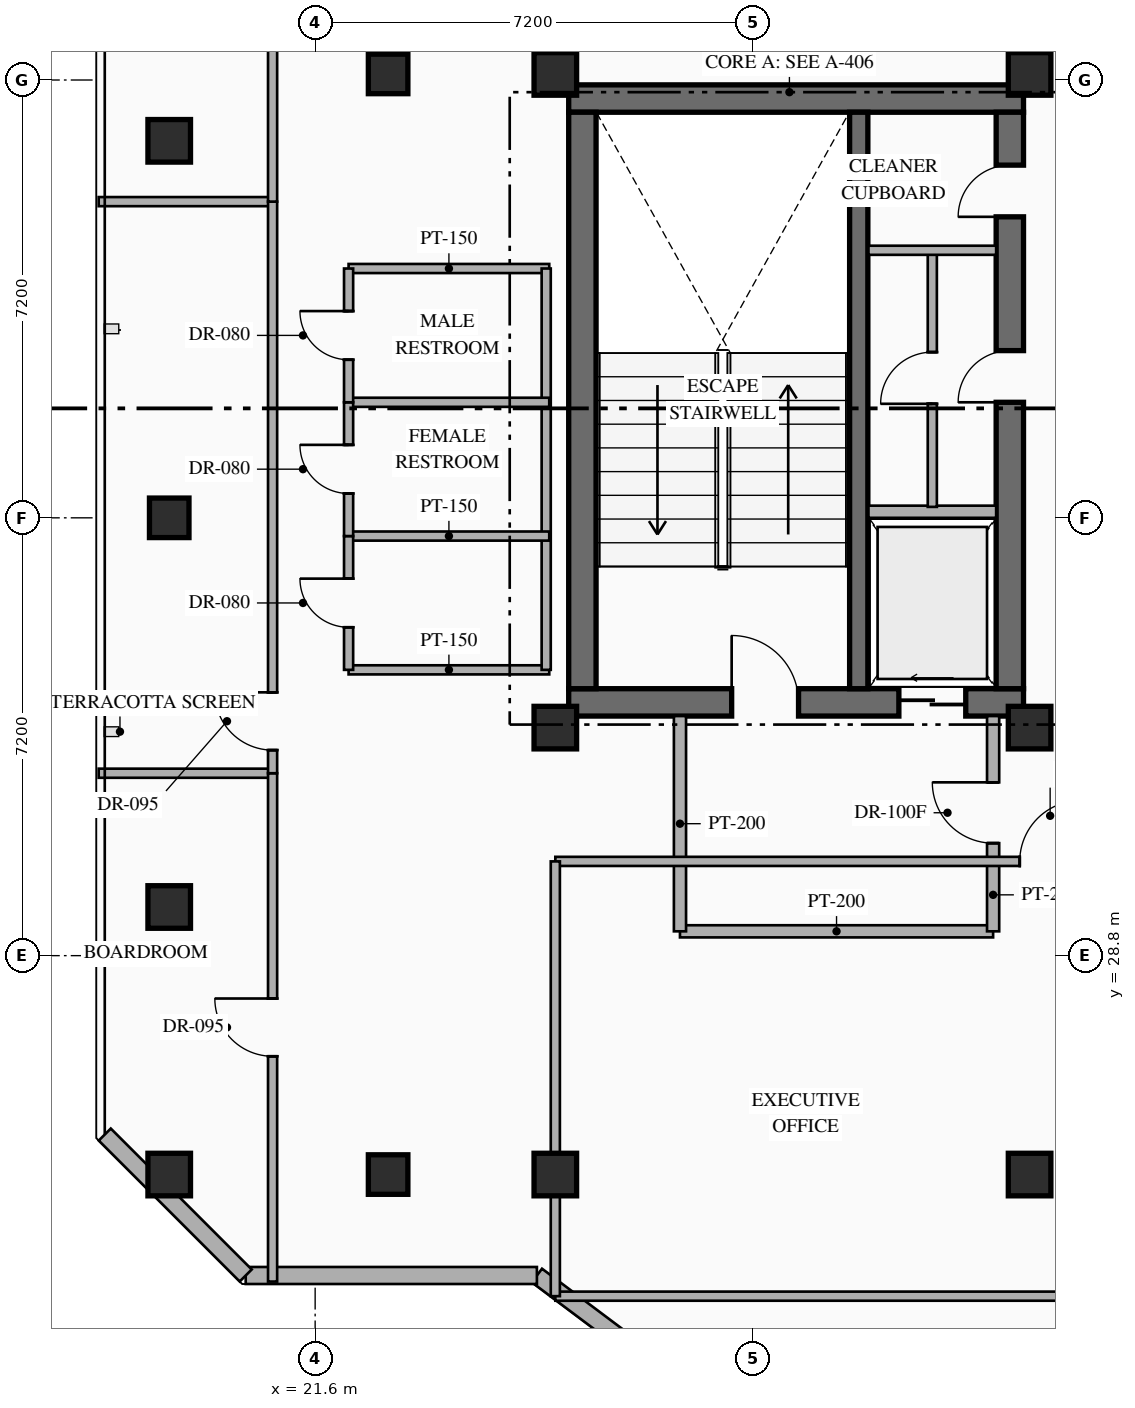
"""IFC4 building model, lengths in metres.
Left out: names, types, materials, properties, quantities, classifications, styles, units other than length and angle.
Written with IfcOpenShell. Run it as: python <this file> out.ifc"""

import sys

from ifc_helpers import new_model, si_unit, direction, frame, frame_2d, origin, origin_2d, place, context, subcontext, project, spatial, rectangle, hollow_rectangle, extrude, element, fill, save


model = new_model("IFC4")
c1 = context("Model", 3, precision=1e-05, world=origin(), true_north=direction((0.0, 1.0)))
c2 = subcontext(c1, "Body", "Model", "MODEL_VIEW")
j1 = project(units=[si_unit("LENGTHUNIT", "METRE"), si_unit("PLANEANGLEUNIT", "RADIAN")], contexts=[c1])
p1 = place(None, origin())
s1 = spatial("IfcSite", under=j1, at=p1, CompositionType="ELEMENT")
p2 = place(p1, origin())
s2 = spatial("IfcBuilding", under=s1, at=p2, CompositionType="ELEMENT")
p3 = place(p2, frame((0.0, 0.0, 231.15)))
s3 = spatial("IfcBuildingStorey", under=s2, at=p3, CompositionType="ELEMENT", Elevation=231.15)
p4 = place(p3, frame((25.77, 32.965, 0.0), z_axis=(0.0, 0.0, 1.0), x_axis=(1.0, 0.0, 0.0)))
e1 = element("IfcWall", 1, at=p4, inside=s3, PredefinedType="SHEAR", context=c2, shape_type="SweptSolid", body=[
    extrude(rectangle(XDim=7.48, YDim=0.45, at=frame_2d((3.74, 0.0))), origin(), (0.0, 0.0, 1.0), 3.6),
])
p5 = place(p4, frame((2.68, 0.0, 0.0)))
e2 = element("IfcOpeningElement", 2, at=p5, cuts=e1, PredefinedType="OPENING", context=c2, shape_type="SweptSolid", body=[
    extrude(rectangle(XDim=1.1, YDim=2.2, at=frame_2d((0.55, 1.1))), frame((0.0, 0.235, 0.0), z_axis=(0.0, -1.0, 0.0), x_axis=(1.0, 0.0, 0.0)), (0.0, 0.0, 1.0), 0.47),
])
p6 = place(p4, frame((5.43, 0.0, 0.0)))
e3 = element("IfcOpeningElement", 3, at=p6, cuts=e1, PredefinedType="OPENING", context=c2, shape_type="SweptSolid", body=[
    extrude(rectangle(XDim=1.1, YDim=2.15, at=frame_2d((0.55, 1.075))), frame((0.0, 0.235, 0.0), z_axis=(0.0, -1.0, 0.0), x_axis=(1.0, 0.0, 0.0)), (0.0, 0.0, 1.0), 0.47),
])
p7 = place(p3, frame((25.77, 42.895, 0.0), z_axis=(0.0, 0.0, 1.0), x_axis=(1.0, 0.0, 0.0)))
e4 = element("IfcWall", 4, at=p7, inside=s3, PredefinedType="SHEAR", context=c2, shape_type="SweptSolid", body=[
    extrude(rectangle(XDim=7.48, YDim=0.45, at=frame_2d((3.74, 0.0))), origin(), (0.0, 0.0, 1.0), 3.6),
])
p8 = place(p3, frame((25.995, 33.19, 0.0), z_axis=(0.0, 0.0, 1.0), x_axis=(0.0, 1.0, 0.0)))
e5 = element("IfcWall", 5, at=p8, inside=s3, PredefinedType="SHEAR", context=c2, shape_type="SweptSolid", body=[
    extrude(rectangle(XDim=9.48, YDim=0.45, at=frame_2d((4.74, 0.0))), origin(), (0.0, 0.0, 1.0), 3.6),
])
p9 = place(p3, frame((33.025, 33.19, 0.0), z_axis=(0.0, 0.0, 1.0), x_axis=(0.0, 1.0, 0.0)))
e6 = element("IfcWall", 6, at=p9, inside=s3, PredefinedType="SHEAR", context=c2, shape_type="SweptSolid", body=[
    extrude(rectangle(XDim=9.48, YDim=0.45, at=frame_2d((4.74, 0.0))), origin(), (0.0, 0.0, 1.0), 3.6),
])
p10 = place(p9, frame((4.71, 0.0, 0.0)))
e7 = element("IfcOpeningElement", 7, at=p10, cuts=e6, PredefinedType="OPENING", context=c2, shape_type="SweptSolid", body=[
    extrude(rectangle(XDim=0.85, YDim=2.08, at=frame_2d((0.425, 1.04))), frame((0.0, 0.235, 0.0), z_axis=(0.0, -1.0, 0.0), x_axis=(1.0, 0.0, 0.0)), (0.0, 0.0, 1.0), 0.47),
])
p11 = place(p9, frame((7.76, 0.0, 0.0)))
e8 = element("IfcOpeningElement", 8, at=p11, cuts=e6, PredefinedType="OPENING", context=c2, shape_type="SweptSolid", body=[
    extrude(rectangle(XDim=0.85, YDim=2.08, at=frame_2d((0.425, 1.04))), frame((0.0, 0.235, 0.0), z_axis=(0.0, -1.0, 0.0), x_axis=(1.0, 0.0, 0.0)), (0.0, 0.0, 1.0), 0.47),
])
p12 = place(p3, frame((30.54, 33.19, 0.0), z_axis=(0.0, 0.0, 1.0), x_axis=(0.0, 1.0, 0.0)))
e9 = element("IfcWall", 9, at=p12, inside=s3, PredefinedType="SHEAR", context=c2, shape_type="SweptSolid", body=[
    extrude(rectangle(XDim=9.48, YDim=0.3, at=frame_2d((4.74, 0.0))), origin(), (0.0, 0.0, 1.0), 3.6),
])
for number, where, z_axis, x_axis in (
    (10, (25.55, 32.55, 0.0), (0.0, 0.0, 1.0), (1.0, 0.0, 0.0)),
    (11, (33.35, 32.55, 0.0), (0.0, 0.0, 1.0), (1.0, 0.0, 0.0)),
    (12, (25.55, 43.3, 0.0), (0.0, 0.0, 1.0), (1.0, 0.0, 0.0)),
    (13, (33.35, 43.3, 0.0), (0.0, 0.0, 1.0), (1.0, 0.0, 0.0)),
    (14, (25.55, 25.2, 0.0), (0.0, 0.0, 1.0), (1.0, 0.0, 0.0)),
    (15, (33.35, 25.2, 0.0), (0.0, 0.0, 1.0), (1.0, 0.0, 0.0)),
    (16, (19.2, 25.2, 0.0), (0.0, 0.0, 1.0), (1.0, 0.0, 0.0)),
    (17, (19.2, 29.6, 0.0), (0.0, 0.0, 1.0), (1.0, 0.0, 0.0)),
    (18, (19.2, 42.2, 0.0), (0.0, 0.0, 1.0), (1.0, 0.0, 0.0)),
):
    element("IfcColumn", number, at=place(p3, frame(where, z_axis=z_axis, x_axis=x_axis)), inside=s3, PredefinedType="COLUMN", context=c2, shape_type="SweptSolid", body=[
        extrude(hollow_rectangle(XDim=0.7, YDim=0.7, WallThickness=0.028, at=origin_2d()), origin(), (0.0, 0.0, 1.0), 3.6),
    ])
for number, where, z_axis, x_axis in (
    (19, (22.8, 25.2, 0.0), (0.0, 0.0, 1.0), (1.0, 0.0, 0.0)),
    (20, (22.8, 43.3, 0.0), (0.0, 0.0, 1.0), (1.0, 0.0, 0.0)),
    (21, (19.2, 36.0, 0.0), (0.0, 0.0, 1.0), (1.0, 0.0, 0.0)),
):
    element("IfcColumn", number, at=place(p3, frame(where, z_axis=z_axis, x_axis=x_axis)), inside=s3, PredefinedType="COLUMN", context=c2, shape_type="SweptSolid", body=[
        extrude(hollow_rectangle(XDim=0.65, YDim=0.65, WallThickness=0.025, at=origin_2d()), origin(), (0.0, 0.0, 1.0), 3.6),
    ])
p13 = place(p3, frame((44.918, 8.787, 0.0), z_axis=(0.0, 0.0, 1.0), x_axis=(-0.800004765927, 0.599993645378, 0.0)))
e22 = element("IfcWall", 22, at=p13, inside=s3, PredefinedType="STANDARD", context=c2, shape_type="SweptSolid", body=[
    extrude(rectangle(XDim=24.588, YDim=0.28, at=frame_2d((12.294, 0.0))), origin(), (0.0, 0.0, 1.0), 3.3),
])
p14 = place(p3, frame((25.247, 23.54, 0.0), z_axis=(0.0, 0.0, 1.0), x_axis=(-1.0, 0.0, 0.0)))
e23 = element("IfcWall", 23, at=p14, inside=s3, PredefinedType="STANDARD", context=c2, shape_type="SweptSolid", body=[
    extrude(rectangle(XDim=4.789, YDim=0.28, at=frame_2d((2.395, 0.0))), origin(), (0.0, 0.0, 1.0), 3.3),
])
p15 = place(p3, frame((20.458, 23.54, 0.0), z_axis=(0.0, 0.0, 1.0), x_axis=(-0.707144017911, 0.707069542501, 0.0)))
e24 = element("IfcWall", 24, at=p15, inside=s3, PredefinedType="STANDARD", context=c2, shape_type="SweptSolid", body=[
    extrude(rectangle(XDim=3.278, YDim=0.28, at=frame_2d((1.639, 0.0))), origin(), (0.0, 0.0, 1.0), 3.3),
])
p16 = place(p3, frame((30.7, 36.1, 0.0), z_axis=(0.0, 0.0, 1.0), x_axis=(1.0, 0.0, 0.0)))
e25 = element("IfcWall", 25, at=p16, inside=s3, PredefinedType="STANDARD", context=c2, shape_type="SweptSolid", body=[
    extrude(rectangle(XDim=2.1, YDim=0.2, at=frame_2d((1.05, 0.0))), origin(), (0.0, 0.0, 1.0), 3.3),
])
p17 = place(p3, frame((31.75, 36.18, 0.0), z_axis=(0.0, 0.0, 1.0), x_axis=(0.0, 1.0, 0.0)))
e26 = element("IfcWall", 26, at=p17, inside=s3, PredefinedType="PARTITIONING", context=c2, shape_type="SweptSolid", body=[
    extrude(rectangle(XDim=4.24, YDim=0.15, at=frame_2d((2.12, 0.0))), origin(), (0.0, 0.0, 1.0), 3.3),
])
p18 = place(p17, frame((1.695, 0.0, 0.0)))
e27 = element("IfcOpeningElement", 27, at=p18, cuts=e26, PredefinedType="OPENING", context=c2, shape_type="SweptSolid", body=[
    extrude(rectangle(XDim=0.85, YDim=2.08, at=frame_2d((0.425, 1.04))), frame((0.0, 0.085, 0.0), z_axis=(0.0, -1.0, 0.0), x_axis=(1.0, 0.0, 0.0)), (0.0, 0.0, 1.0), 0.17),
])
p19 = place(p3, frame((30.7, 40.4, 0.0), z_axis=(0.0, 0.0, 1.0), x_axis=(1.0, 0.0, 0.0)))
e28 = element("IfcWall", 28, at=p19, inside=s3, PredefinedType="PARTITIONING", context=c2, shape_type="SweptSolid", body=[
    extrude(rectangle(XDim=2.1, YDim=0.15, at=frame_2d((1.05, 0.0))), origin(), (0.0, 0.0, 1.0), 3.3),
])
p20 = place(p3, frame((27.6, 29.2, 0.0), z_axis=(0.0, 0.0, 1.0), x_axis=(1.0, 0.0, 0.0)))
e29 = element("IfcWall", 29, at=p20, inside=s3, PredefinedType="STANDARD", context=c2, shape_type="SweptSolid", body=[
    extrude(rectangle(XDim=5.15, YDim=0.2, at=frame_2d((2.575, 0.0))), origin(), (0.0, 0.0, 1.0), 3.3),
])
p21 = place(p3, frame((27.6, 29.2, 0.0), z_axis=(0.0, 0.0, 1.0), x_axis=(0.0, 1.0, 0.0)))
e30 = element("IfcWall", 30, at=p21, inside=s3, PredefinedType="STANDARD", context=c2, shape_type="SweptSolid", body=[
    extrude(rectangle(XDim=3.54, YDim=0.2, at=frame_2d((1.77, 0.0))), origin(), (0.0, 0.0, 1.0), 3.3),
])
p22 = place(p3, frame((32.75, 29.2, 0.0), z_axis=(0.0, 0.0, 1.0), x_axis=(0.0, 1.0, 0.0)))
e31 = element("IfcWall", 31, at=p22, inside=s3, PredefinedType="STANDARD", context=c2, shape_type="SweptSolid", body=[
    extrude(rectangle(XDim=3.54, YDim=0.2, at=frame_2d((1.77, 0.0))), origin(), (0.0, 0.0, 1.0), 3.3),
])
p23 = place(p22, frame((1.45, 0.0, 0.0)))
e32 = element("IfcOpeningElement", 32, at=p23, cuts=e31, PredefinedType="OPENING", context=c2, shape_type="SweptSolid", body=[
    extrude(rectangle(XDim=1.0, YDim=2.2, at=frame_2d((0.5, 1.1))), frame((0.0, 0.11, 0.0), z_axis=(0.0, -1.0, 0.0), x_axis=(1.0, 0.0, 0.0)), (0.0, 0.0, 1.0), 0.22),
])
for number, where, z_axis, x_axis in (
    (33, (22.15, 33.5, 0.0), (0.0, 0.0, 1.0), (1.0, 0.0, 0.0)),
    (34, (22.15, 40.1, 0.0), (0.0, 0.0, 1.0), (1.0, 0.0, 0.0)),
):
    element("IfcWall", number, at=place(p3, frame(where, z_axis=z_axis, x_axis=x_axis)), inside=s3, PredefinedType="PARTITIONING", context=c2, shape_type="SweptSolid", body=[
        extrude(rectangle(XDim=3.3, YDim=0.15, at=frame_2d((1.65, 0.0))), origin(), (0.0, 0.0, 1.0), 3.3),
    ])
p24 = place(p3, frame((25.4, 33.5, 0.0), z_axis=(0.0, 0.0, 1.0), x_axis=(0.0, 1.0, 0.0)))
e35 = element("IfcWall", 35, at=p24, inside=s3, PredefinedType="PARTITIONING", context=c2, shape_type="SweptSolid", body=[
    extrude(rectangle(XDim=6.6, YDim=0.15, at=frame_2d((3.3, 0.0))), origin(), (0.0, 0.0, 1.0), 3.3),
])
for number, where, z_axis, x_axis in (
    (36, (22.15, 35.7, 0.0), (0.0, 0.0, 1.0), (1.0, 0.0, 0.0)),
    (37, (22.15, 37.9, 0.0), (0.0, 0.0, 1.0), (1.0, 0.0, 0.0)),
):
    element("IfcWall", number, at=place(p3, frame(where, z_axis=z_axis, x_axis=x_axis)), inside=s3, PredefinedType="PARTITIONING", context=c2, shape_type="SweptSolid", body=[
        extrude(rectangle(XDim=3.3, YDim=0.15, at=frame_2d((1.65, 0.0))), origin(), (0.0, 0.0, 1.0), 3.3),
    ])
p25 = place(p3, frame((22.15, 33.5, 0.0), z_axis=(0.0, 0.0, 1.0), x_axis=(0.0, 1.0, 0.0)))
e38 = element("IfcWall", 38, at=p25, inside=s3, PredefinedType="PARTITIONING", context=c2, shape_type="SweptSolid", body=[
    extrude(rectangle(XDim=2.2, YDim=0.15, at=frame_2d((1.1, 0.0))), origin(), (0.0, 0.0, 1.0), 3.3),
])
p26 = place(p25, frame((0.7, 0.0, 0.0)))
e39 = element("IfcOpeningElement", 39, at=p26, cuts=e38, PredefinedType="OPENING", context=c2, shape_type="SweptSolid", body=[
    extrude(rectangle(XDim=0.8, YDim=2.06, at=frame_2d((0.4, 1.03))), frame((0.0, 0.085, 0.0), z_axis=(0.0, -1.0, 0.0), x_axis=(1.0, 0.0, 0.0)), (0.0, 0.0, 1.0), 0.17),
])
p27 = place(p3, frame((22.15, 35.7, 0.0), z_axis=(0.0, 0.0, 1.0), x_axis=(0.0, 1.0, 0.0)))
e40 = element("IfcWall", 40, at=p27, inside=s3, PredefinedType="PARTITIONING", context=c2, shape_type="SweptSolid", body=[
    extrude(rectangle(XDim=2.2, YDim=0.15, at=frame_2d((1.1, 0.0))), origin(), (0.0, 0.0, 1.0), 3.3),
])
p28 = place(p27, frame((0.7, 0.0, 0.0)))
e41 = element("IfcOpeningElement", 41, at=p28, cuts=e40, PredefinedType="OPENING", context=c2, shape_type="SweptSolid", body=[
    extrude(rectangle(XDim=0.8, YDim=2.06, at=frame_2d((0.4, 1.03))), frame((0.0, 0.085, 0.0), z_axis=(0.0, -1.0, 0.0), x_axis=(1.0, 0.0, 0.0)), (0.0, 0.0, 1.0), 0.17),
])
p29 = place(p3, frame((22.15, 37.9, 0.0), z_axis=(0.0, 0.0, 1.0), x_axis=(0.0, 1.0, 0.0)))
e42 = element("IfcWall", 42, at=p29, inside=s3, PredefinedType="PARTITIONING", context=c2, shape_type="SweptSolid", body=[
    extrude(rectangle(XDim=2.2, YDim=0.15, at=frame_2d((1.1, 0.0))), origin(), (0.0, 0.0, 1.0), 3.3),
])
p30 = place(p29, frame((0.7, 0.0, 0.0)))
e43 = element("IfcOpeningElement", 43, at=p30, cuts=e42, PredefinedType="OPENING", context=c2, shape_type="SweptSolid", body=[
    extrude(rectangle(XDim=0.8, YDim=2.06, at=frame_2d((0.4, 1.03))), frame((0.0, 0.085, 0.0), z_axis=(0.0, -1.0, 0.0), x_axis=(1.0, 0.0, 0.0)), (0.0, 0.0, 1.0), 0.17),
])
p31 = place(p3, frame((25.55, 23.2, 0.0), z_axis=(0.0, 0.0, 1.0), x_axis=(1.0, 0.0, 0.0)))
e44 = element("IfcWall", 44, at=p31, inside=s3, PredefinedType="PARTITIONING", context=c2, shape_type="SweptSolid", body=[
    extrude(rectangle(XDim=9.4, YDim=0.15, at=frame_2d((4.7, 0.0))), origin(), (0.0, 0.0, 1.0), 3.3),
])
p32 = place(p3, frame((25.55, 30.35, 0.0), z_axis=(0.0, 0.0, 1.0), x_axis=(1.0, 0.0, 0.0)))
e45 = element("IfcWall", 45, at=p32, inside=s3, PredefinedType="PARTITIONING", context=c2, shape_type="SweptSolid", body=[
    extrude(rectangle(XDim=9.4, YDim=0.15, at=frame_2d((4.7, 0.0))), origin(), (0.0, 0.0, 1.0), 3.3),
])
p33 = place(p32, frame((7.638, 0.0, 0.0)))
e46 = element("IfcOpeningElement", 46, at=p33, cuts=e45, PredefinedType="OPENING", context=c2, shape_type="SweptSolid", body=[
    extrude(rectangle(XDim=1.0, YDim=2.15, at=frame_2d((0.5, 1.075))), frame((0.0, 0.085, 0.0), z_axis=(0.0, -1.0, 0.0), x_axis=(1.0, 0.0, 0.0)), (0.0, 0.0, 1.0), 0.17),
])
p34 = place(p3, frame((25.55, 23.2, 0.0), z_axis=(0.0, 0.0, 1.0), x_axis=(0.0, 1.0, 0.0)))
e47 = element("IfcWall", 47, at=p34, inside=s3, PredefinedType="PARTITIONING", context=c2, shape_type="SweptSolid", body=[
    extrude(rectangle(XDim=7.15, YDim=0.15, at=frame_2d((3.575, 0.0))), origin(), (0.0, 0.0, 1.0), 2.707),
])
p35 = place(p3, frame((18.04, 31.8, 0.0), z_axis=(0.0, 0.0, 1.0), x_axis=(1.0, 0.0, 0.0)))
e48 = element("IfcWall", 48, at=p35, inside=s3, PredefinedType="PARTITIONING", context=c2, shape_type="SweptSolid", body=[
    extrude(rectangle(XDim=2.86, YDim=0.15, at=frame_2d((1.43, 0.0))), origin(), (0.0, 0.0, 1.0), 3.3),
])
p36 = place(p3, frame((20.9, 23.44, 0.0), z_axis=(0.0, 0.0, 1.0), x_axis=(0.0, 1.0, 0.0)))
e49 = element("IfcWall", 49, at=p36, inside=s3, PredefinedType="PARTITIONING", context=c2, shape_type="SweptSolid", body=[
    extrude(rectangle(XDim=8.36, YDim=0.15, at=frame_2d((4.18, 0.0))), origin(), (0.0, 0.0, 1.0), 3.3),
])
p37 = place(p36, frame((3.705, 0.0, 0.0)))
e50 = element("IfcOpeningElement", 50, at=p37, cuts=e49, PredefinedType="OPENING", context=c2, shape_type="SweptSolid", body=[
    extrude(rectangle(XDim=0.95, YDim=2.15, at=frame_2d((0.475, 1.075))), frame((0.0, 0.085, 0.0), z_axis=(0.0, -1.0, 0.0), x_axis=(1.0, 0.0, 0.0)), (0.0, 0.0, 1.0), 0.17),
])
p38 = place(p3, frame((18.04, 41.2, 0.0), z_axis=(0.0, 0.0, 1.0), x_axis=(1.0, 0.0, 0.0)))
e51 = element("IfcWall", 51, at=p38, inside=s3, PredefinedType="PARTITIONING", context=c2, shape_type="SweptSolid", body=[
    extrude(rectangle(XDim=2.86, YDim=0.15, at=frame_2d((1.43, 0.0))), origin(), (0.0, 0.0, 1.0), 3.3),
])
p39 = place(p3, frame((20.9, 31.8, 0.0), z_axis=(0.0, 0.0, 1.0), x_axis=(0.0, 1.0, 0.0)))
e52 = element("IfcWall", 52, at=p39, inside=s3, PredefinedType="PARTITIONING", context=c2, shape_type="SweptSolid", body=[
    extrude(rectangle(XDim=9.4, YDim=0.15, at=frame_2d((4.7, 0.0))), origin(), (0.0, 0.0, 1.0), 3.3),
])
p40 = place(p39, frame((0.38, 0.0, 0.0)))
e53 = element("IfcOpeningElement", 53, at=p40, cuts=e52, PredefinedType="OPENING", context=c2, shape_type="SweptSolid", body=[
    extrude(rectangle(XDim=0.95, YDim=2.15, at=frame_2d((0.475, 1.075))), frame((0.0, 0.085, 0.0), z_axis=(0.0, -1.0, 0.0), x_axis=(1.0, 0.0, 0.0)), (0.0, 0.0, 1.0), 0.17),
])
p41 = place(p3, frame((20.9, 41.2, 0.0), z_axis=(0.0, 0.0, 1.0), x_axis=(0.0, 1.0, 0.0)))
e54 = element("IfcWall", 54, at=p41, inside=s3, PredefinedType="PARTITIONING", context=c2, shape_type="SweptSolid", body=[
    extrude(rectangle(XDim=9.16, YDim=0.15, at=frame_2d((4.58, 0.0))), origin(), (0.0, 0.0, 1.0), 3.3),
])
p42 = place(p41, frame((4.85, 0.0, 0.0)))
e55 = element("IfcOpeningElement", 55, at=p42, cuts=e54, PredefinedType="OPENING", context=c2, shape_type="SweptSolid", body=[
    extrude(rectangle(XDim=0.95, YDim=2.15, at=frame_2d((0.475, 1.075))), frame((0.0, 0.085, 0.0), z_axis=(0.0, -1.0, 0.0), x_axis=(1.0, 0.0, 0.0)), (0.0, 0.0, 1.0), 0.17),
])
p43 = place(p5, origin())
e56 = element("IfcDoor", 56, at=p43, inside=s3, OperationType="SINGLE_SWING_LEFT", PredefinedType="DOOR", context=c2, shape_type="SweptSolid", body=[
    extrude(rectangle(XDim=1.1, YDim=2.2, at=frame_2d((0.55, 1.1))), frame((0.0, 0.025, 0.0), z_axis=(0.0, -1.0, 0.0), x_axis=(1.0, 0.0, 0.0)), (0.0, 0.0, 1.0), 0.05),
])
fill(e2, e56)
p44 = place(p6, origin())
e57 = element("IfcDoor", 57, at=p44, inside=s3, OperationType="SLIDING_TO_LEFT", PredefinedType="USERDEFINED", context=c2, shape_type="SweptSolid", body=[
    extrude(rectangle(XDim=1.1, YDim=2.15, at=frame_2d((0.55, 1.075))), frame((0.0, 0.025, 0.0), z_axis=(0.0, -1.0, 0.0), x_axis=(1.0, 0.0, 0.0)), (0.0, 0.0, 1.0), 0.05),
])
fill(e3, e57)
p45 = place(p10, origin())
e58 = element("IfcDoor", 58, at=p45, inside=s3, OperationType="SINGLE_SWING_LEFT", PredefinedType="DOOR", context=c2, shape_type="SweptSolid", body=[
    extrude(rectangle(XDim=0.85, YDim=2.08, at=frame_2d((0.425, 1.04))), frame((0.0, 0.025, 0.0), z_axis=(0.0, -1.0, 0.0), x_axis=(1.0, 0.0, 0.0)), (0.0, 0.0, 1.0), 0.05),
])
fill(e7, e58)
p46 = place(p11, origin())
e59 = element("IfcDoor", 59, at=p46, inside=s3, OperationType="SINGLE_SWING_LEFT", PredefinedType="DOOR", context=c2, shape_type="SweptSolid", body=[
    extrude(rectangle(XDim=0.85, YDim=2.08, at=frame_2d((0.425, 1.04))), frame((0.0, 0.025, 0.0), z_axis=(0.0, -1.0, 0.0), x_axis=(1.0, 0.0, 0.0)), (0.0, 0.0, 1.0), 0.05),
])
fill(e8, e59)
p47 = place(p18, origin())
e60 = element("IfcDoor", 60, at=p47, inside=s3, OperationType="SINGLE_SWING_LEFT", PredefinedType="DOOR", context=c2, shape_type="SweptSolid", body=[
    extrude(rectangle(XDim=0.85, YDim=2.08, at=frame_2d((0.425, 1.04))), frame((0.0, 0.025, 0.0), z_axis=(0.0, -1.0, 0.0), x_axis=(1.0, 0.0, 0.0)), (0.0, 0.0, 1.0), 0.05),
])
fill(e27, e60)
p48 = place(p23, origin())
e61 = element("IfcDoor", 61, at=p48, inside=s3, OperationType="SINGLE_SWING_RIGHT", PredefinedType="DOOR", context=c2, shape_type="SweptSolid", body=[
    extrude(rectangle(XDim=1.0, YDim=2.2, at=frame_2d((0.5, 1.1))), frame((0.0, 0.025, 0.0), z_axis=(0.0, -1.0, 0.0), x_axis=(1.0, 0.0, 0.0)), (0.0, 0.0, 1.0), 0.05),
])
fill(e32, e61)
p49 = place(p26, origin())
e62 = element("IfcDoor", 62, at=p49, inside=s3, OperationType="SINGLE_SWING_RIGHT", PredefinedType="DOOR", context=c2, shape_type="SweptSolid", body=[
    extrude(rectangle(XDim=0.8, YDim=2.06, at=frame_2d((0.4, 1.03))), frame((0.0, 0.025, 0.0), z_axis=(0.0, -1.0, 0.0), x_axis=(1.0, 0.0, 0.0)), (0.0, 0.0, 1.0), 0.05),
])
fill(e39, e62)
p50 = place(p28, origin())
e63 = element("IfcDoor", 63, at=p50, inside=s3, OperationType="SINGLE_SWING_RIGHT", PredefinedType="DOOR", context=c2, shape_type="SweptSolid", body=[
    extrude(rectangle(XDim=0.8, YDim=2.06, at=frame_2d((0.4, 1.03))), frame((0.0, 0.025, 0.0), z_axis=(0.0, -1.0, 0.0), x_axis=(1.0, 0.0, 0.0)), (0.0, 0.0, 1.0), 0.05),
])
fill(e41, e63)
p51 = place(p30, origin())
e64 = element("IfcDoor", 64, at=p51, inside=s3, OperationType="SINGLE_SWING_RIGHT", PredefinedType="DOOR", context=c2, shape_type="SweptSolid", body=[
    extrude(rectangle(XDim=0.8, YDim=2.06, at=frame_2d((0.4, 1.03))), frame((0.0, 0.025, 0.0), z_axis=(0.0, -1.0, 0.0), x_axis=(1.0, 0.0, 0.0)), (0.0, 0.0, 1.0), 0.05),
])
fill(e43, e64)
p52 = place(p33, origin())
e65 = element("IfcDoor", 65, at=p52, inside=s3, OperationType="SINGLE_SWING_RIGHT", PredefinedType="DOOR", context=c2, shape_type="SweptSolid", body=[
    extrude(rectangle(XDim=1.0, YDim=2.15, at=frame_2d((0.5, 1.075))), frame((0.0, 0.025, 0.0), z_axis=(0.0, -1.0, 0.0), x_axis=(1.0, 0.0, 0.0)), (0.0, 0.0, 1.0), 0.05),
])
fill(e46, e65)
p53 = place(p37, origin())
e66 = element("IfcDoor", 66, at=p53, inside=s3, OperationType="SINGLE_SWING_RIGHT", PredefinedType="DOOR", context=c2, shape_type="SweptSolid", body=[
    extrude(rectangle(XDim=0.95, YDim=2.15, at=frame_2d((0.475, 1.075))), frame((0.0, 0.025, 0.0), z_axis=(0.0, -1.0, 0.0), x_axis=(1.0, 0.0, 0.0)), (0.0, 0.0, 1.0), 0.05),
])
fill(e50, e66)
p54 = place(p40, origin())
e67 = element("IfcDoor", 67, at=p54, inside=s3, OperationType="SINGLE_SWING_RIGHT", PredefinedType="DOOR", context=c2, shape_type="SweptSolid", body=[
    extrude(rectangle(XDim=0.95, YDim=2.15, at=frame_2d((0.475, 1.075))), frame((0.0, 0.025, 0.0), z_axis=(0.0, -1.0, 0.0), x_axis=(1.0, 0.0, 0.0)), (0.0, 0.0, 1.0), 0.05),
])
fill(e53, e67)
save(model, sys.argv[1])
